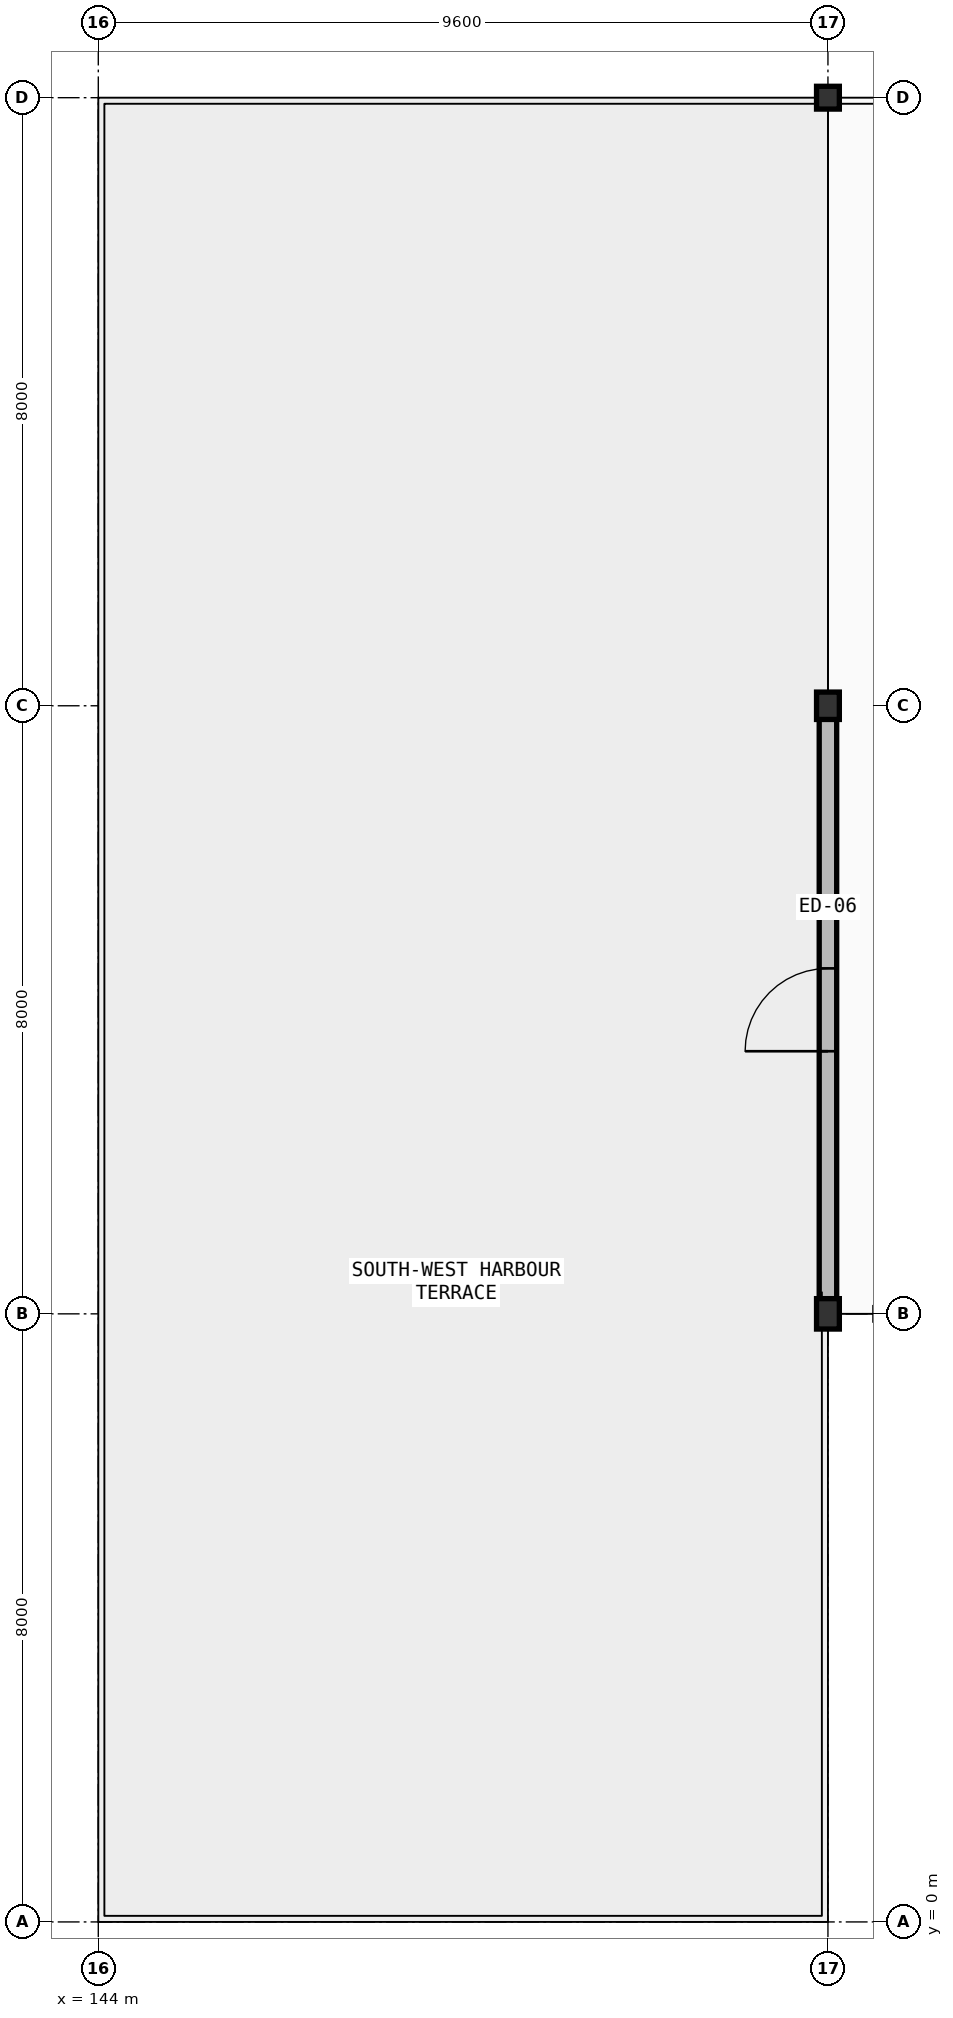
"""IFC4 building model, lengths in metres.
Left out: names, types, materials, properties, quantities, classifications, styles, units other than length and angle.
Written with IfcOpenShell. Run it as: python <this file> out.ifc"""

import sys

from ifc_helpers import new_model, si_unit, direction, frame, frame_2d, origin, origin_2d, place, context, subcontext, project, spatial, rectangle, i_section, extrude, element, fill, save


model = new_model("IFC4")
c1 = context("Model", 3, precision=1e-05, world=origin(), true_north=direction((0.0, 1.0)))
c2 = subcontext(c1, "Body", "Model", "MODEL_VIEW")
j1 = project(units=[si_unit("LENGTHUNIT", "METRE"), si_unit("PLANEANGLEUNIT", "RADIAN")], contexts=[c1])
p1 = place(None, origin())
s1 = spatial("IfcSite", under=j1, at=p1, CompositionType="ELEMENT")
p2 = place(p1, origin())
s2 = spatial("IfcBuilding", under=s1, at=p2, CompositionType="ELEMENT")
p3 = place(p2, frame((0.0, 0.0, 15.9)))
s3 = spatial("IfcBuildingStorey", under=s2, at=p3, CompositionType="ELEMENT", Elevation=15.9)
p4 = place(p3, frame((153.6, 8.0, 0.0), z_axis=(0.0, 0.0, 1.0), x_axis=(1.0, 0.0, 0.0)))
e1 = element("IfcColumn", 1, at=p4, inside=s3, PredefinedType="COLUMN", context=c2, shape_type="SweptSolid", body=[
    extrude(i_section(OverallWidth=0.3, OverallDepth=0.4, WebThickness=0.013, FlangeThickness=0.024, FilletRadius=0.027, at=origin_2d()), origin(), (0.0, 0.0, 1.0), 4.5),
])
p5 = place(p3, frame((153.6, 16.0, 0.0), z_axis=(0.0, 0.0, 1.0), x_axis=(1.0, 0.0, 0.0)))
e2 = element("IfcColumn", 2, at=p5, inside=s3, PredefinedType="COLUMN", context=c2, shape_type="SweptSolid", body=[
    extrude(i_section(OverallWidth=0.3, OverallDepth=0.36, WebThickness=0.012, FlangeThickness=0.022, FilletRadius=0.027, at=origin_2d()), origin(), (0.0, 0.0, 1.0), 4.5),
])
p6 = place(p3, frame((153.6, 24.0, 0.0), z_axis=(0.0, 0.0, 1.0), x_axis=(1.0, 0.0, 0.0)))
e3 = element("IfcColumn", 3, at=p6, inside=s3, PredefinedType="COLUMN", context=c2, shape_type="SweptSolid", body=[
    extrude(i_section(OverallWidth=0.3, OverallDepth=0.3, WebThickness=0.011, FlangeThickness=0.019, FilletRadius=0.027, at=origin_2d()), origin(), (0.0, 0.0, 1.0), 4.5),
])
p7 = place(p3, frame((153.6, 8.0, 0.0), z_axis=(0.0, 0.0, 1.0), x_axis=(0.0, 1.0, 0.0)))
e4 = element("IfcWall", 4, at=p7, inside=s3, PredefinedType="STANDARD", context=c2, shape_type="SweptSolid", body=[
    extrude(rectangle(XDim=8.0, YDim=0.23, at=frame_2d((4.0, 0.0))), origin(), (0.0, 0.0, 1.0), 3.005),
])
p8 = place(p7, frame((3.455, 0.0, 0.0)))
e5 = element("IfcOpeningElement", 5, at=p8, cuts=e4, PredefinedType="OPENING", context=c2, shape_type="SweptSolid", body=[
    extrude(rectangle(XDim=1.09, YDim=2.22, at=frame_2d((0.545, 1.11))), frame((0.0, 0.125, 0.0), z_axis=(0.0, -1.0, 0.0), x_axis=(1.0, 0.0, 0.0)), (0.0, 0.0, 1.0), 0.25),
])
p9 = place(p8, origin())
e6 = element("IfcDoor", 6, at=p9, inside=s3, OperationType="SINGLE_SWING_LEFT", PredefinedType="DOOR", context=c2, shape_type="SweptSolid", body=[
    extrude(rectangle(XDim=1.09, YDim=2.22, at=frame_2d((0.545, 1.11))), frame((0.0, 0.025, 0.0), z_axis=(0.0, -1.0, 0.0), x_axis=(1.0, 0.0, 0.0)), (0.0, 0.0, 1.0), 0.05),
])
fill(e5, e6)
save(model, sys.argv[1])
